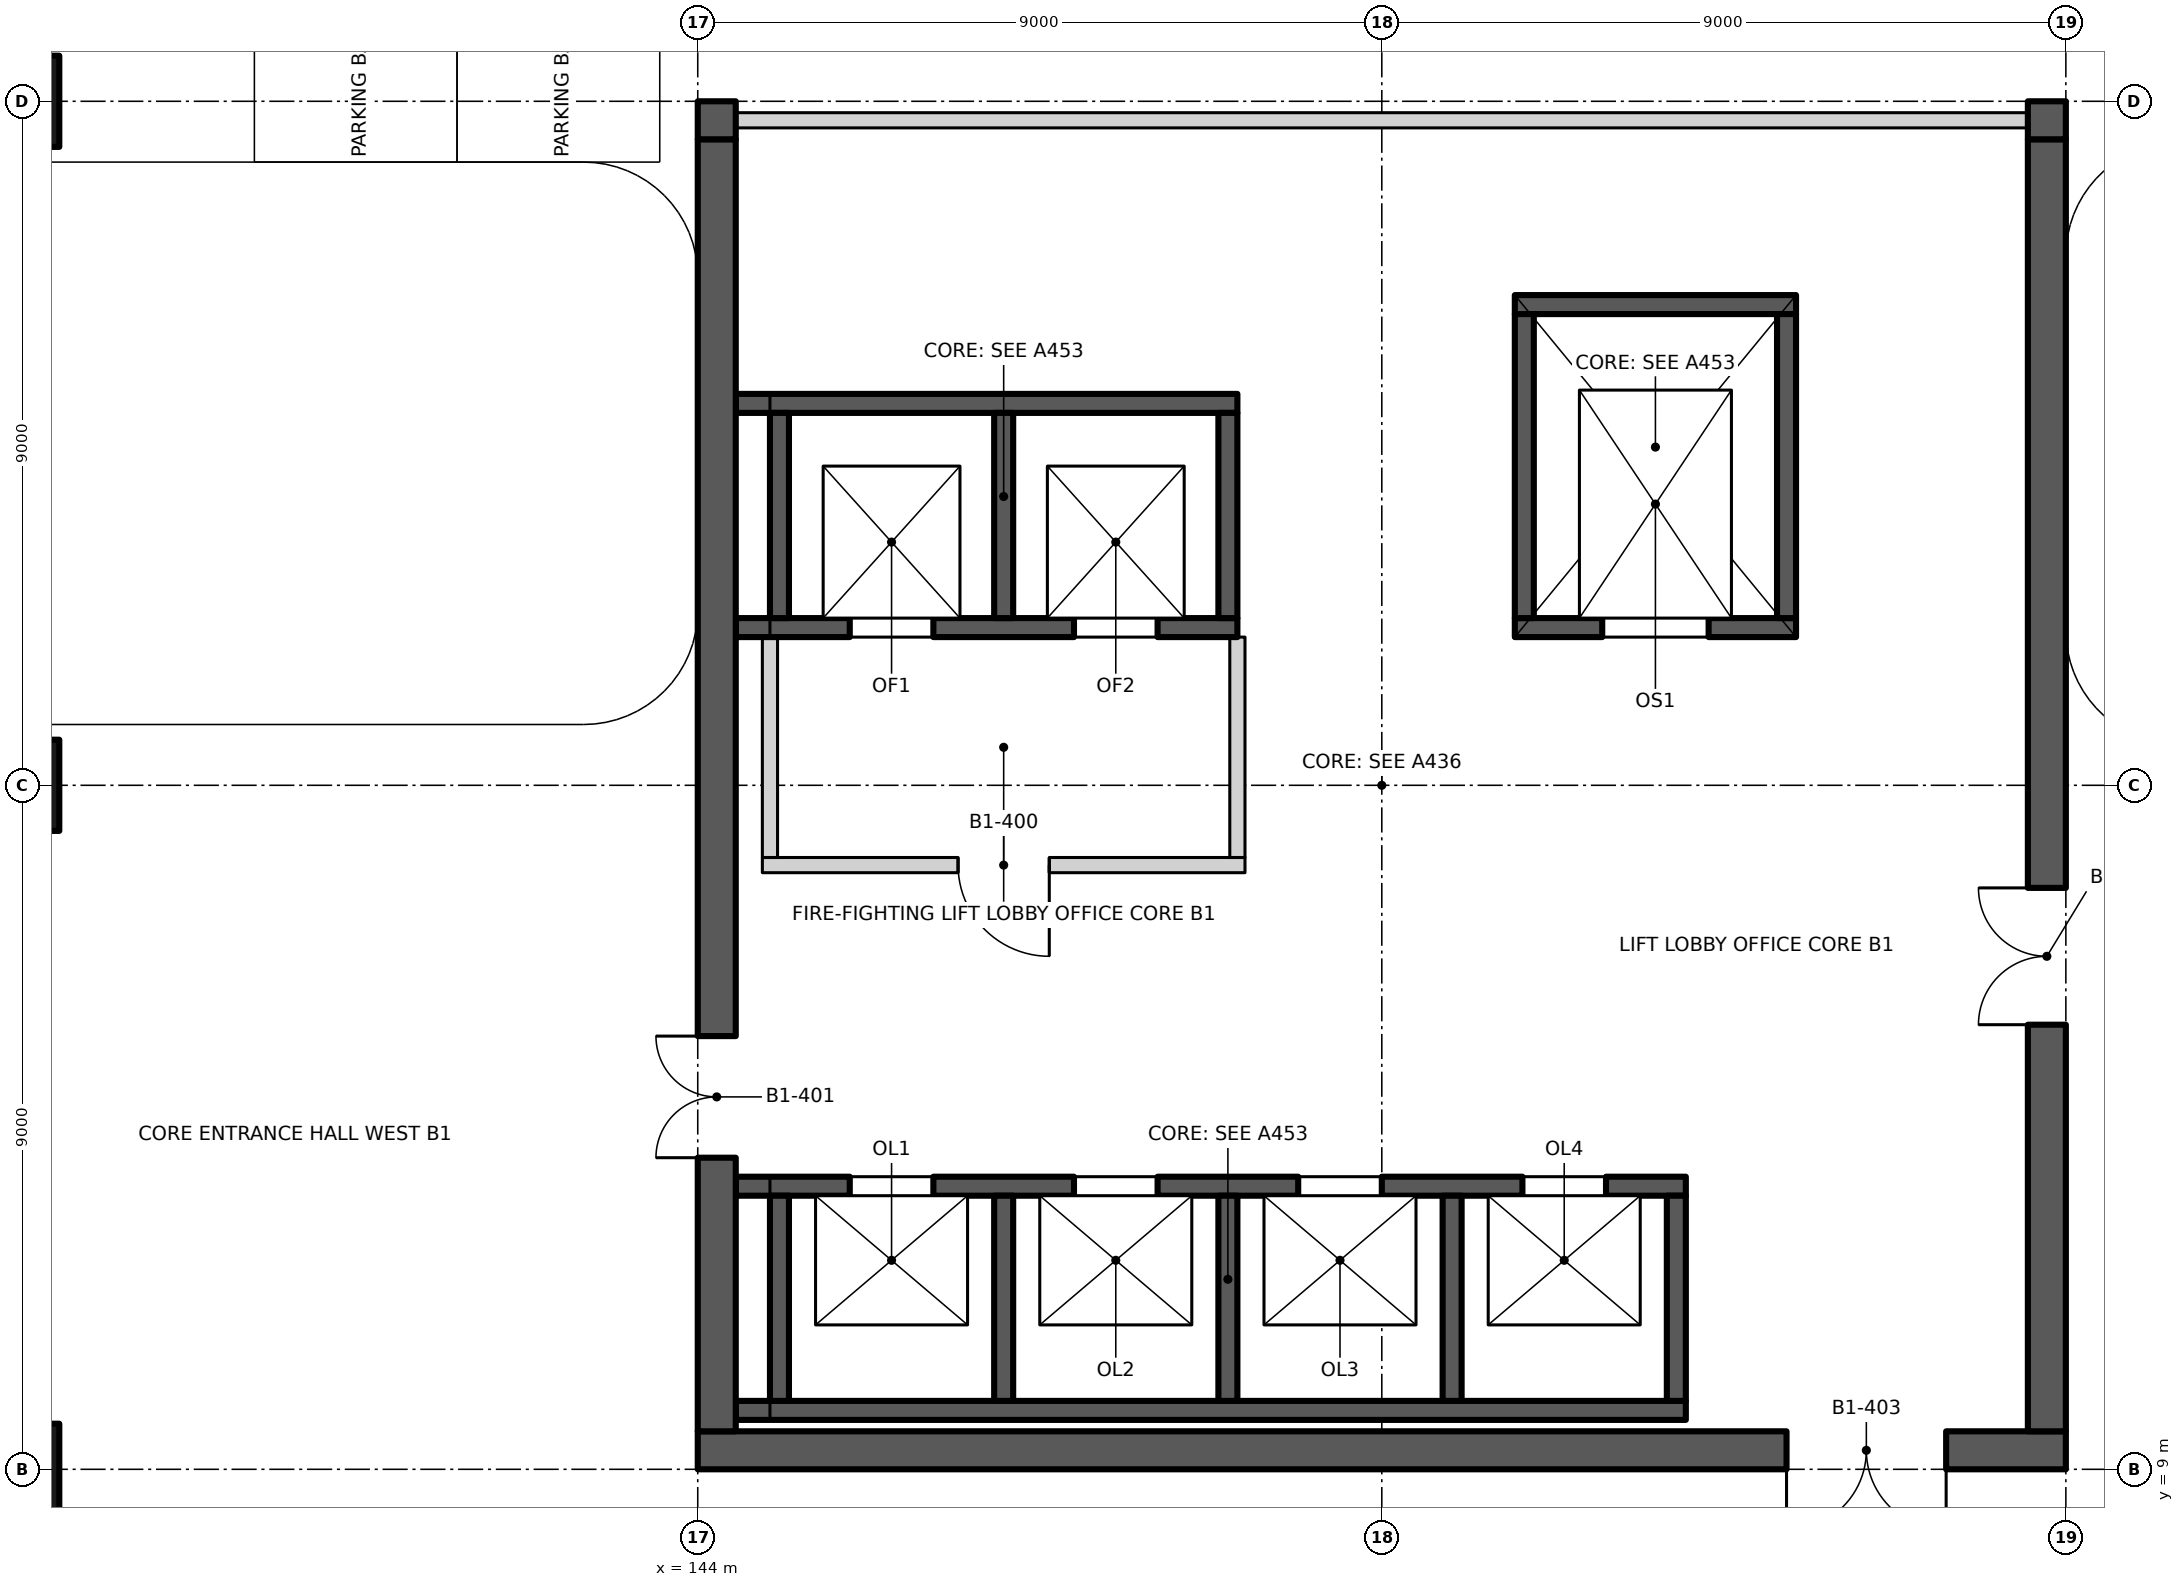
"""IFC4 building model, lengths in metres.
Left out: names, types, materials, properties, quantities, classifications, styles, units other than length and angle.
Written with IfcOpenShell. Run it as: python <this file> out.ifc"""

import sys

from ifc_helpers import new_model, si_unit, direction, frame, frame_2d, origin, origin_2d, place, context, subcontext, project, spatial, rectangle, extrude, element, fill, save


model = new_model("IFC4")
c1 = context("Model", 3, precision=1e-05, world=origin(), true_north=direction((0.0, 1.0)))
c2 = subcontext(c1, "Body", "Model", "MODEL_VIEW")
j1 = project(units=[si_unit("LENGTHUNIT", "METRE"), si_unit("PLANEANGLEUNIT", "RADIAN")], contexts=[c1])
p1 = place(None, origin())
s1 = spatial("IfcSite", under=j1, at=p1, CompositionType="ELEMENT")
p2 = place(p1, origin())
s2 = spatial("IfcBuilding", under=s1, at=p2, CompositionType="ELEMENT")
p3 = place(p2, frame((0.0, 0.0, -5.1)))
s3 = spatial("IfcBuildingStorey", under=s2, at=p3, CompositionType="ELEMENT", Elevation=-5.1)
for number, where, z_axis, x_axis in (
    (1, (135.0, 9.0, 0.0), (0.0, 0.0, 1.0), (1.0, 0.0, 0.0)),
    (2, (135.0, 18.0, 0.0), (0.0, 0.0, 1.0), (1.0, 0.0, 0.0)),
    (3, (135.0, 27.0, 0.0), (0.0, 0.0, 1.0), (1.0, 0.0, 0.0)),
):
    element("IfcColumn", number, at=place(p3, frame(where, z_axis=z_axis, x_axis=x_axis)), inside=s3, PredefinedType="COLUMN", context=c2, shape_type="SweptSolid", body=[
        extrude(rectangle(XDim=1.2, YDim=1.2, at=origin_2d()), origin(), (0.0, 0.0, 1.0), 5.1),
    ])
p4 = place(p3, frame((144.5, 12.725, 0.0), z_axis=(0.0, 0.0, 1.0), x_axis=(1.0, 0.0, 0.0)))
e4 = element("IfcWall", 4, at=p4, inside=s3, PredefinedType="SHEAR", context=c2, shape_type="SweptSolid", body=[
    extrude(rectangle(XDim=12.5, YDim=0.25, at=frame_2d((6.25, 0.0))), origin(), (0.0, 0.0, 1.0), 5.1),
])
p5 = place(p4, frame((1.5, 0.0, 0.0)))
e5 = element("IfcOpeningElement", 5, at=p5, cuts=e4, PredefinedType="OPENING", context=c2, shape_type="SweptSolid", body=[
    extrude(rectangle(XDim=1.1, YDim=2.1, at=frame_2d((0.55, 1.05))), frame((0.0, 0.135, 0.0), z_axis=(0.0, -1.0, 0.0), x_axis=(1.0, 0.0, 0.0)), (0.0, 0.0, 1.0), 0.27),
])
p6 = place(p4, frame((4.45, 0.0, 0.0)))
e6 = element("IfcOpeningElement", 6, at=p6, cuts=e4, PredefinedType="OPENING", context=c2, shape_type="SweptSolid", body=[
    extrude(rectangle(XDim=1.1, YDim=2.1, at=frame_2d((0.55, 1.05))), frame((0.0, 0.135, 0.0), z_axis=(0.0, -1.0, 0.0), x_axis=(1.0, 0.0, 0.0)), (0.0, 0.0, 1.0), 0.27),
])
p7 = place(p4, frame((7.4, 0.0, 0.0)))
e7 = element("IfcOpeningElement", 7, at=p7, cuts=e4, PredefinedType="OPENING", context=c2, shape_type="SweptSolid", body=[
    extrude(rectangle(XDim=1.1, YDim=2.1, at=frame_2d((0.55, 1.05))), frame((0.0, 0.135, 0.0), z_axis=(0.0, -1.0, 0.0), x_axis=(1.0, 0.0, 0.0)), (0.0, 0.0, 1.0), 0.27),
])
p8 = place(p4, frame((10.35, 0.0, 0.0)))
e8 = element("IfcOpeningElement", 8, at=p8, cuts=e4, PredefinedType="OPENING", context=c2, shape_type="SweptSolid", body=[
    extrude(rectangle(XDim=1.1, YDim=2.1, at=frame_2d((0.55, 1.05))), frame((0.0, 0.135, 0.0), z_axis=(0.0, -1.0, 0.0), x_axis=(1.0, 0.0, 0.0)), (0.0, 0.0, 1.0), 0.27),
])
p9 = place(p3, frame((144.5, 9.775, 0.0), z_axis=(0.0, 0.0, 1.0), x_axis=(1.0, 0.0, 0.0)))
e9 = element("IfcWall", 9, at=p9, inside=s3, PredefinedType="SHEAR", context=c2, shape_type="SweptSolid", body=[
    extrude(rectangle(XDim=12.5, YDim=0.25, at=frame_2d((6.25, 0.0))), origin(), (0.0, 0.0, 1.0), 5.1),
])
for number, where, z_axis, x_axis in (
    (10, (145.075, 9.9, 0.0), (0.0, 0.0, 1.0), (0.0, 1.0, 0.0)),
    (11, (148.025, 9.9, 0.0), (0.0, 0.0, 1.0), (0.0, 1.0, 0.0)),
    (12, (150.975, 9.9, 0.0), (0.0, 0.0, 1.0), (0.0, 1.0, 0.0)),
    (13, (153.925, 9.9, 0.0), (0.0, 0.0, 1.0), (0.0, 1.0, 0.0)),
    (14, (156.875, 9.9, 0.0), (0.0, 0.0, 1.0), (0.0, 1.0, 0.0)),
):
    element("IfcWall", number, at=place(p3, frame(where, z_axis=z_axis, x_axis=x_axis)), inside=s3, PredefinedType="SHEAR", context=c2, shape_type="SweptSolid", body=[
        extrude(rectangle(XDim=2.7, YDim=0.25, at=frame_2d((1.35, 0.0))), origin(), (0.0, 0.0, 1.0), 5.1),
    ])
p10 = place(p3, frame((144.5, 20.075, 0.0), z_axis=(0.0, 0.0, 1.0), x_axis=(1.0, 0.0, 0.0)))
e15 = element("IfcWall", 15, at=p10, inside=s3, PredefinedType="SHEAR", context=c2, shape_type="SweptSolid", body=[
    extrude(rectangle(XDim=6.6, YDim=0.25, at=frame_2d((3.3, 0.0))), origin(), (0.0, 0.0, 1.0), 5.1),
])
p11 = place(p10, frame((1.5, 0.0, 0.0)))
e16 = element("IfcOpeningElement", 16, at=p11, cuts=e15, PredefinedType="OPENING", context=c2, shape_type="SweptSolid", body=[
    extrude(rectangle(XDim=1.1, YDim=2.1, at=frame_2d((0.55, 1.05))), frame((0.0, 0.135, 0.0), z_axis=(0.0, -1.0, 0.0), x_axis=(1.0, 0.0, 0.0)), (0.0, 0.0, 1.0), 0.27),
])
p12 = place(p10, frame((4.45, 0.0, 0.0)))
e17 = element("IfcOpeningElement", 17, at=p12, cuts=e15, PredefinedType="OPENING", context=c2, shape_type="SweptSolid", body=[
    extrude(rectangle(XDim=1.1, YDim=2.1, at=frame_2d((0.55, 1.05))), frame((0.0, 0.135, 0.0), z_axis=(0.0, -1.0, 0.0), x_axis=(1.0, 0.0, 0.0)), (0.0, 0.0, 1.0), 0.27),
])
p13 = place(p3, frame((144.5, 23.025, 0.0), z_axis=(0.0, 0.0, 1.0), x_axis=(1.0, 0.0, 0.0)))
e18 = element("IfcWall", 18, at=p13, inside=s3, PredefinedType="SHEAR", context=c2, shape_type="SweptSolid", body=[
    extrude(rectangle(XDim=6.6, YDim=0.25, at=frame_2d((3.3, 0.0))), origin(), (0.0, 0.0, 1.0), 5.1),
])
for number, where, z_axis, x_axis in (
    (19, (145.075, 20.2, 0.0), (0.0, 0.0, 1.0), (0.0, 1.0, 0.0)),
    (20, (148.025, 20.2, 0.0), (0.0, 0.0, 1.0), (0.0, 1.0, 0.0)),
    (21, (150.975, 20.2, 0.0), (0.0, 0.0, 1.0), (0.0, 1.0, 0.0)),
):
    element("IfcWall", number, at=place(p3, frame(where, z_axis=z_axis, x_axis=x_axis)), inside=s3, PredefinedType="SHEAR", context=c2, shape_type="SweptSolid", body=[
        extrude(rectangle(XDim=2.7, YDim=0.25, at=frame_2d((1.35, 0.0))), origin(), (0.0, 0.0, 1.0), 5.1),
    ])
p14 = place(p3, frame((154.75, 20.075, 0.0), z_axis=(0.0, 0.0, 1.0), x_axis=(1.0, 0.0, 0.0)))
e22 = element("IfcWall", 22, at=p14, inside=s3, PredefinedType="SHEAR", context=c2, shape_type="SweptSolid", body=[
    extrude(rectangle(XDim=3.7, YDim=0.25, at=frame_2d((1.85, 0.0))), origin(), (0.0, 0.0, 1.0), 5.1),
])
p15 = place(p14, frame((1.15, 0.0, 0.0)))
e23 = element("IfcOpeningElement", 23, at=p15, cuts=e22, PredefinedType="OPENING", context=c2, shape_type="SweptSolid", body=[
    extrude(rectangle(XDim=1.4, YDim=2.1, at=frame_2d((0.7, 1.05))), frame((0.0, 0.135, 0.0), z_axis=(0.0, -1.0, 0.0), x_axis=(1.0, 0.0, 0.0)), (0.0, 0.0, 1.0), 0.27),
])
p16 = place(p3, frame((154.75, 24.325, 0.0), z_axis=(0.0, 0.0, 1.0), x_axis=(1.0, 0.0, 0.0)))
e24 = element("IfcWall", 24, at=p16, inside=s3, PredefinedType="SHEAR", context=c2, shape_type="SweptSolid", body=[
    extrude(rectangle(XDim=3.7, YDim=0.25, at=frame_2d((1.85, 0.0))), origin(), (0.0, 0.0, 1.0), 5.1),
])
for number, where, z_axis, x_axis in (
    (25, (154.875, 20.2, 0.0), (0.0, 0.0, 1.0), (0.0, 1.0, 0.0)),
    (26, (158.325, 20.2, 0.0), (0.0, 0.0, 1.0), (0.0, 1.0, 0.0)),
):
    element("IfcWall", number, at=place(p3, frame(where, z_axis=z_axis, x_axis=x_axis)), inside=s3, PredefinedType="SHEAR", context=c2, shape_type="SweptSolid", body=[
        extrude(rectangle(XDim=4.0, YDim=0.25, at=frame_2d((2.0, 0.0))), origin(), (0.0, 0.0, 1.0), 5.1),
    ])
p17 = place(p3, frame((144.0, 9.25, 0.0), z_axis=(0.0, 0.0, 1.0), x_axis=(1.0, 0.0, 0.0)))
e27 = element("IfcWall", 27, at=p17, inside=s3, PredefinedType="SHEAR", context=c2, shape_type="SweptSolid", body=[
    extrude(rectangle(XDim=18.0, YDim=0.5, at=frame_2d((9.0, 0.0))), origin(), (0.0, 0.0, 1.0), 4.75),
])
p18 = place(p17, frame((16.425, 0.0, 0.0), z_axis=(0.0, 0.0, 1.0), x_axis=(-1.0, 0.0, 0.0)))
e28 = element("IfcOpeningElement", 28, at=p18, cuts=e27, PredefinedType="OPENING", context=c2, shape_type="SweptSolid", body=[
    extrude(rectangle(XDim=2.1, YDim=2.4, at=frame_2d((1.05, 1.2))), frame((0.0, 0.26, 0.0), z_axis=(0.0, -1.0, 0.0), x_axis=(1.0, 0.0, 0.0)), (0.0, 0.0, 1.0), 0.52),
])
p19 = place(p3, frame((144.85, 16.95, 0.0), z_axis=(0.0, 0.0, 1.0), x_axis=(1.0, 0.0, 0.0)))
e29 = element("IfcWall", 29, at=p19, inside=s3, PredefinedType="PARTITIONING", context=c2, shape_type="SweptSolid", body=[
    extrude(rectangle(XDim=6.35, YDim=0.2, at=frame_2d((3.175, 0.0))), origin(), (0.0, 0.0, 1.0), 4.75),
])
p20 = place(p19, frame((3.775, 0.0, 0.0), z_axis=(0.0, 0.0, 1.0), x_axis=(-1.0, 0.0, 0.0)))
e30 = element("IfcOpeningElement", 30, at=p20, cuts=e29, PredefinedType="OPENING", context=c2, shape_type="SweptSolid", body=[
    extrude(rectangle(XDim=1.2, YDim=2.1, at=frame_2d((0.6, 1.05))), frame((0.0, 0.11, 0.0), z_axis=(0.0, -1.0, 0.0), x_axis=(1.0, 0.0, 0.0)), (0.0, 0.0, 1.0), 0.22),
])
p21 = place(p3, frame((144.5, 26.75, 0.0), z_axis=(0.0, 0.0, 1.0), x_axis=(1.0, 0.0, 0.0)))
e31 = element("IfcWall", 31, at=p21, inside=s3, PredefinedType="PARTITIONING", context=c2, shape_type="SweptSolid", body=[
    extrude(rectangle(XDim=17.0, YDim=0.2, at=frame_2d((8.5, 0.0))), origin(), (0.0, 0.0, 1.0), 4.2),
])
p22 = place(p3, frame((144.25, 9.5, 0.0), z_axis=(0.0, 0.0, 1.0), x_axis=(0.0, 1.0, 0.0)))
e32 = element("IfcWall", 32, at=p22, inside=s3, PredefinedType="SHEAR", context=c2, shape_type="SweptSolid", body=[
    extrude(rectangle(XDim=17.0, YDim=0.5, at=frame_2d((8.5, 0.0))), origin(), (0.0, 0.0, 1.0), 4.75),
])
p23 = place(p22, frame((3.6, 0.0, 0.0)))
e33 = element("IfcOpeningElement", 33, at=p23, cuts=e32, PredefinedType="OPENING", context=c2, shape_type="SweptSolid", body=[
    extrude(rectangle(XDim=1.6, YDim=2.4, at=frame_2d((0.8, 1.2))), frame((0.0, 0.26, 0.0), z_axis=(0.0, -1.0, 0.0), x_axis=(1.0, 0.0, 0.0)), (0.0, 0.0, 1.0), 0.52),
])
p24 = place(p3, frame((144.25, 26.5, 0.0), z_axis=(0.0, 0.0, 1.0), x_axis=(0.0, 1.0, 0.0)))
e34 = element("IfcWall", 34, at=p24, inside=s3, PredefinedType="SHEAR", context=c2, shape_type="SweptSolid", body=[
    extrude(rectangle(XDim=0.5, YDim=0.5, at=frame_2d((0.25, 0.0))), origin(), (0.0, 0.0, 1.0), 4.2),
])
for number, where, z_axis, x_axis in (
    (35, (144.95, 17.05, 0.0), (0.0, 0.0, 1.0), (0.0, 1.0, 0.0)),
    (36, (151.1, 17.05, 0.0), (0.0, 0.0, 1.0), (0.0, 1.0, 0.0)),
):
    element("IfcWall", number, at=place(p3, frame(where, z_axis=z_axis, x_axis=x_axis)), inside=s3, PredefinedType="PARTITIONING", context=c2, shape_type="SweptSolid", body=[
        extrude(rectangle(XDim=2.9, YDim=0.2, at=frame_2d((1.45, 0.0))), origin(), (0.0, 0.0, 1.0), 4.75),
    ])
p25 = place(p3, frame((161.75, 9.5, 0.0), z_axis=(0.0, 0.0, 1.0), x_axis=(0.0, 1.0, 0.0)))
e37 = element("IfcWall", 37, at=p25, inside=s3, PredefinedType="SHEAR", context=c2, shape_type="SweptSolid", body=[
    extrude(rectangle(XDim=17.0, YDim=0.5, at=frame_2d((8.5, 0.0))), origin(), (0.0, 0.0, 1.0), 4.75),
])
p26 = place(p25, frame((5.35, 0.0, 0.0)))
e38 = element("IfcOpeningElement", 38, at=p26, cuts=e37, PredefinedType="OPENING", context=c2, shape_type="SweptSolid", body=[
    extrude(rectangle(XDim=1.8, YDim=2.4, at=frame_2d((0.9, 1.2))), frame((0.0, 0.26, 0.0), z_axis=(0.0, -1.0, 0.0), x_axis=(1.0, 0.0, 0.0)), (0.0, 0.0, 1.0), 0.52),
])
p27 = place(p3, frame((161.75, 26.5, 0.0), z_axis=(0.0, 0.0, 1.0), x_axis=(0.0, 1.0, 0.0)))
e39 = element("IfcWall", 39, at=p27, inside=s3, PredefinedType="SHEAR", context=c2, shape_type="SweptSolid", body=[
    extrude(rectangle(XDim=0.5, YDim=0.5, at=frame_2d((0.25, 0.0))), origin(), (0.0, 0.0, 1.0), 4.2),
])
p28 = place(p11, origin())
e40 = element("IfcDoor", 40, at=p28, inside=s3, OperationType="DOUBLE_DOOR_SLIDING", PredefinedType="DOOR", context=c2, shape_type="SweptSolid", body=[
    extrude(rectangle(XDim=1.1, YDim=2.1, at=frame_2d((0.55, 1.05))), frame((0.0, 0.025, 0.0), z_axis=(0.0, -1.0, 0.0), x_axis=(1.0, 0.0, 0.0)), (0.0, 0.0, 1.0), 0.05),
])
fill(e16, e40)
p29 = place(p12, origin())
e41 = element("IfcDoor", 41, at=p29, inside=s3, OperationType="DOUBLE_DOOR_SLIDING", PredefinedType="DOOR", context=c2, shape_type="SweptSolid", body=[
    extrude(rectangle(XDim=1.1, YDim=2.1, at=frame_2d((0.55, 1.05))), frame((0.0, 0.025, 0.0), z_axis=(0.0, -1.0, 0.0), x_axis=(1.0, 0.0, 0.0)), (0.0, 0.0, 1.0), 0.05),
])
fill(e17, e41)
p30 = place(p5, origin())
e42 = element("IfcDoor", 42, at=p30, inside=s3, OperationType="DOUBLE_DOOR_SLIDING", PredefinedType="DOOR", context=c2, shape_type="SweptSolid", body=[
    extrude(rectangle(XDim=1.1, YDim=2.1, at=frame_2d((0.55, 1.05))), frame((0.0, 0.025, 0.0), z_axis=(0.0, -1.0, 0.0), x_axis=(1.0, 0.0, 0.0)), (0.0, 0.0, 1.0), 0.05),
])
fill(e5, e42)
p31 = place(p6, origin())
e43 = element("IfcDoor", 43, at=p31, inside=s3, OperationType="DOUBLE_DOOR_SLIDING", PredefinedType="DOOR", context=c2, shape_type="SweptSolid", body=[
    extrude(rectangle(XDim=1.1, YDim=2.1, at=frame_2d((0.55, 1.05))), frame((0.0, 0.025, 0.0), z_axis=(0.0, -1.0, 0.0), x_axis=(1.0, 0.0, 0.0)), (0.0, 0.0, 1.0), 0.05),
])
fill(e6, e43)
p32 = place(p7, origin())
e44 = element("IfcDoor", 44, at=p32, inside=s3, OperationType="DOUBLE_DOOR_SLIDING", PredefinedType="DOOR", context=c2, shape_type="SweptSolid", body=[
    extrude(rectangle(XDim=1.1, YDim=2.1, at=frame_2d((0.55, 1.05))), frame((0.0, 0.025, 0.0), z_axis=(0.0, -1.0, 0.0), x_axis=(1.0, 0.0, 0.0)), (0.0, 0.0, 1.0), 0.05),
])
fill(e7, e44)
p33 = place(p8, origin())
e45 = element("IfcDoor", 45, at=p33, inside=s3, OperationType="DOUBLE_DOOR_SLIDING", PredefinedType="DOOR", context=c2, shape_type="SweptSolid", body=[
    extrude(rectangle(XDim=1.1, YDim=2.1, at=frame_2d((0.55, 1.05))), frame((0.0, 0.025, 0.0), z_axis=(0.0, -1.0, 0.0), x_axis=(1.0, 0.0, 0.0)), (0.0, 0.0, 1.0), 0.05),
])
fill(e8, e45)
p34 = place(p15, origin())
e46 = element("IfcDoor", 46, at=p34, inside=s3, OperationType="DOUBLE_DOOR_SLIDING", PredefinedType="DOOR", context=c2, shape_type="SweptSolid", body=[
    extrude(rectangle(XDim=1.4, YDim=2.1, at=frame_2d((0.7, 1.05))), frame((0.0, 0.025, 0.0), z_axis=(0.0, -1.0, 0.0), x_axis=(1.0, 0.0, 0.0)), (0.0, 0.0, 1.0), 0.05),
])
fill(e23, e46)
p35 = place(p20, origin())
e47 = element("IfcDoor", 47, at=p35, inside=s3, OperationType="SINGLE_SWING_LEFT", PredefinedType="DOOR", context=c2, shape_type="SweptSolid", body=[
    extrude(rectangle(XDim=1.2, YDim=2.1, at=frame_2d((0.6, 1.05))), frame((0.0, 0.025, 0.0), z_axis=(0.0, -1.0, 0.0), x_axis=(1.0, 0.0, 0.0)), (0.0, 0.0, 1.0), 0.05),
])
fill(e30, e47)
p36 = place(p23, origin())
e48 = element("IfcDoor", 48, at=p36, inside=s3, OperationType="DOUBLE_DOOR_SINGLE_SWING", PredefinedType="DOOR", context=c2, shape_type="SweptSolid", body=[
    extrude(rectangle(XDim=1.6, YDim=2.4, at=frame_2d((0.8, 1.2))), frame((0.0, 0.025, 0.0), z_axis=(0.0, -1.0, 0.0), x_axis=(1.0, 0.0, 0.0)), (0.0, 0.0, 1.0), 0.05),
])
fill(e33, e48)
p37 = place(p26, origin())
e49 = element("IfcDoor", 49, at=p37, inside=s3, OperationType="DOUBLE_DOOR_SINGLE_SWING", PredefinedType="DOOR", context=c2, shape_type="SweptSolid", body=[
    extrude(rectangle(XDim=1.8, YDim=2.4, at=frame_2d((0.9, 1.2))), frame((0.0, 0.025, 0.0), z_axis=(0.0, -1.0, 0.0), x_axis=(1.0, 0.0, 0.0)), (0.0, 0.0, 1.0), 0.05),
])
fill(e38, e49)
p38 = place(p18, origin())
e50 = element("IfcDoor", 50, at=p38, inside=s3, OperationType="DOUBLE_DOOR_SINGLE_SWING", PredefinedType="DOOR", context=c2, shape_type="SweptSolid", body=[
    extrude(rectangle(XDim=2.1, YDim=2.4, at=frame_2d((1.05, 1.2))), frame((0.0, 0.025, 0.0), z_axis=(0.0, -1.0, 0.0), x_axis=(1.0, 0.0, 0.0)), (0.0, 0.0, 1.0), 0.05),
])
fill(e28, e50)
save(model, sys.argv[1])
